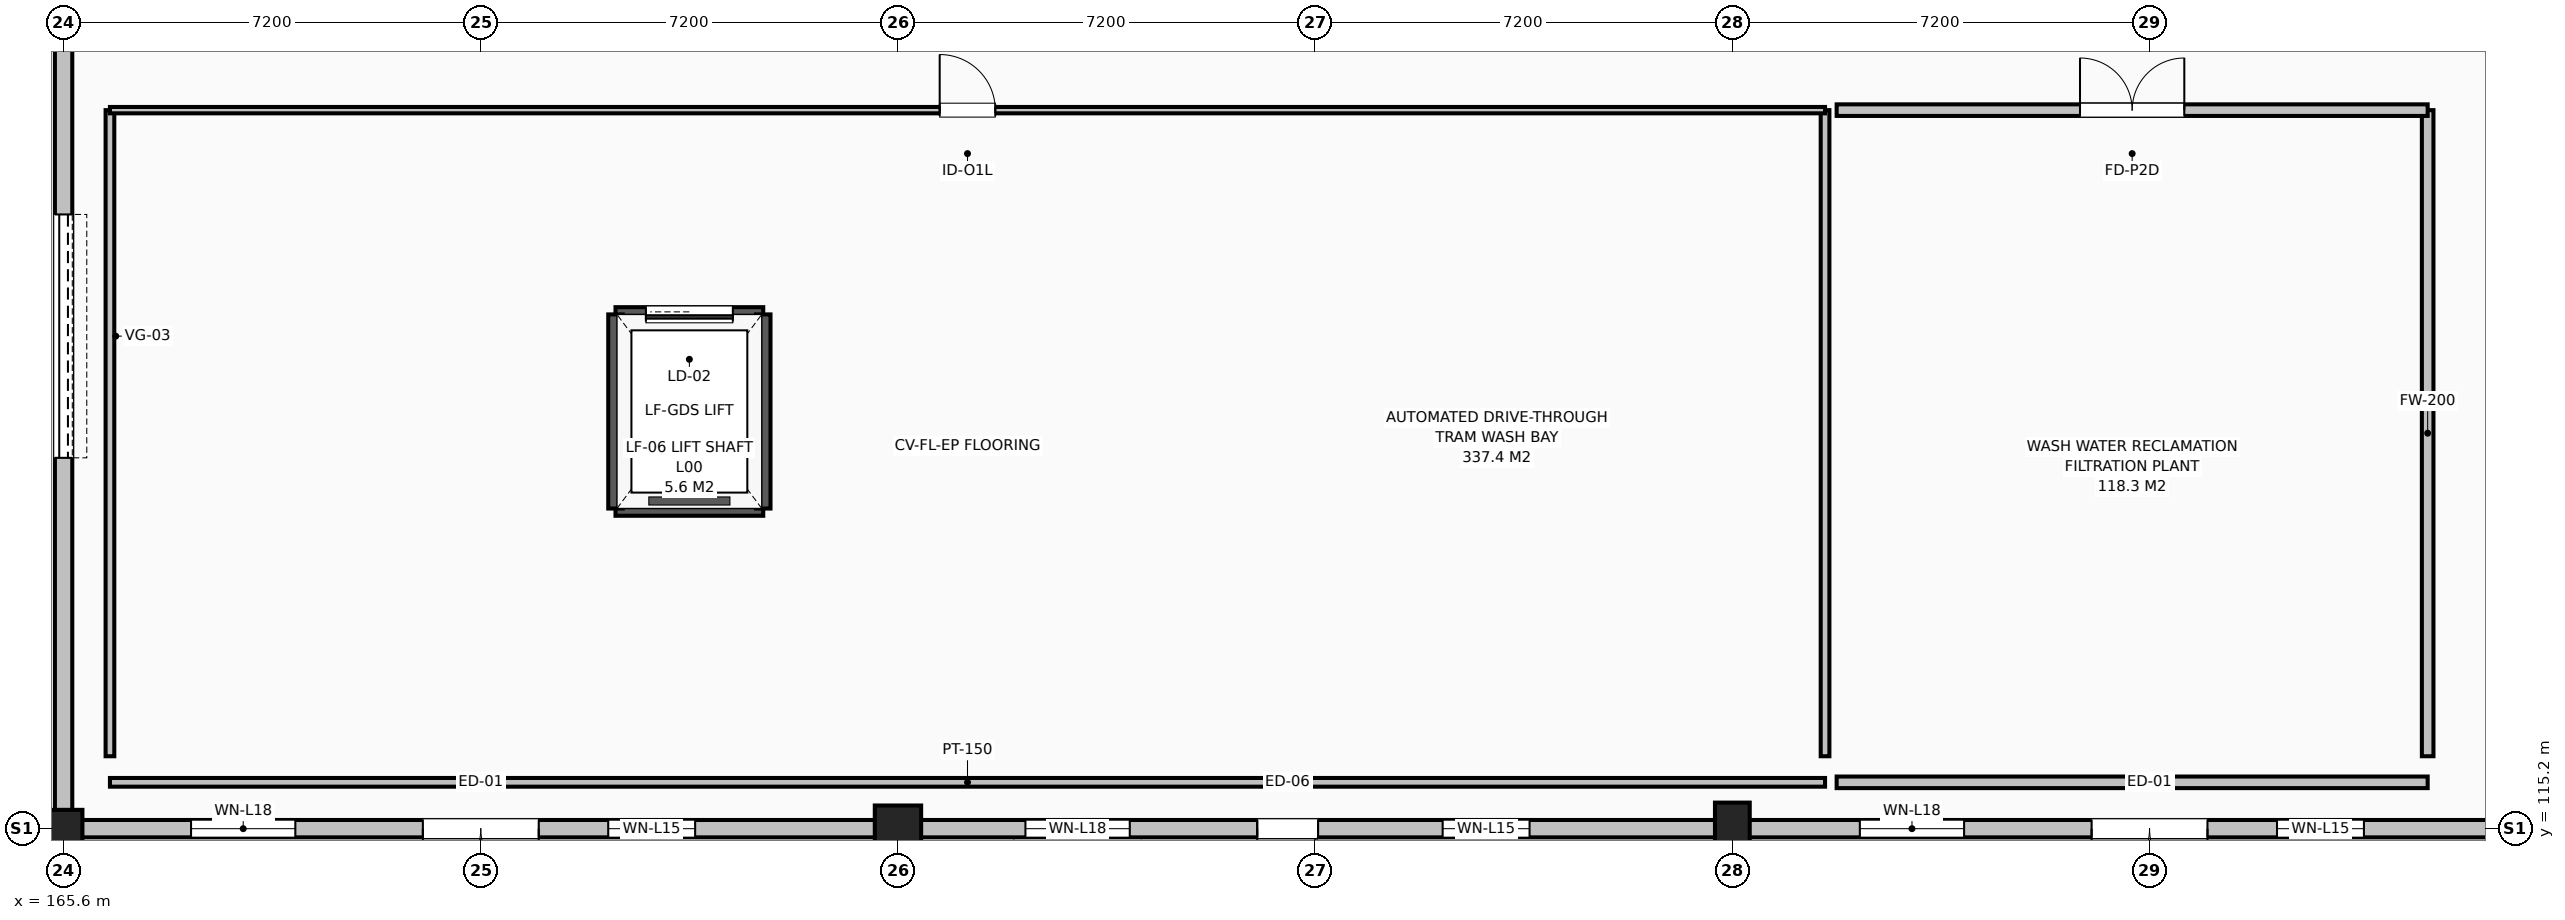
"""IFC4 building model, lengths in metres.
Left out: names, types, materials, properties, quantities, classifications, styles, units other than length and angle.
Written with IfcOpenShell. Run it as: python <this file> out.ifc"""

import sys

from ifc_helpers import new_model, si_unit, direction, frame, frame_2d, origin, origin_2d, place, context, subcontext, project, spatial, rectangle, extrude, element, fill, save


model = new_model("IFC4")
c1 = context("Model", 3, precision=1e-05, world=origin(), true_north=direction((0.0, 1.0)))
c2 = subcontext(c1, "Body", "Model", "MODEL_VIEW")
j1 = project(units=[si_unit("LENGTHUNIT", "METRE"), si_unit("PLANEANGLEUNIT", "RADIAN")], contexts=[c1])
p1 = place(None, origin())
s1 = spatial("IfcSite", under=j1, at=p1, CompositionType="ELEMENT")
p2 = place(p1, origin())
s2 = spatial("IfcBuilding", under=s1, at=p2, CompositionType="ELEMENT")
p3 = place(p2, origin())
s3 = spatial("IfcBuildingStorey", under=s2, at=p3, CompositionType="ELEMENT", Elevation=0.0)
p4 = place(p3, frame((165.6, 115.2, 0.0), z_axis=(0.0, 0.0, 1.0), x_axis=(1.0, 0.0, 0.0)))
e1 = element("IfcColumn", 1, at=p4, inside=s3, PredefinedType="COLUMN", context=c2, shape_type="SweptSolid", body=[
    extrude(rectangle(XDim=0.65, YDim=0.65, at=origin_2d()), origin(), (0.0, 0.0, 1.0), 4.8),
])
p5 = place(p3, frame((180.0, 115.2, 0.0), z_axis=(0.0, 0.0, 1.0), x_axis=(1.0, 0.0, 0.0)))
e2 = element("IfcColumn", 2, at=p5, inside=s3, PredefinedType="COLUMN", context=c2, shape_type="SweptSolid", body=[
    extrude(rectangle(XDim=0.8, YDim=0.8, at=origin_2d()), origin(), (0.0, 0.0, 1.0), 4.8),
])
p6 = place(p3, frame((194.4, 115.2, 0.0), z_axis=(0.0, 0.0, 1.0), x_axis=(1.0, 0.0, 0.0)))
e3 = element("IfcColumn", 3, at=p6, inside=s3, PredefinedType="COLUMN", context=c2, shape_type="SweptSolid", body=[
    extrude(rectangle(XDim=0.6, YDim=0.9, at=origin_2d()), origin(), (0.0, 0.0, 1.0), 4.8),
])
p7 = place(p3, frame((165.6, 115.2, 0.0), z_axis=(0.0, 0.0, 1.0), x_axis=(1.0, 0.0, 0.0)))
e4 = element("IfcWall", 4, at=p7, inside=s3, PredefinedType="SOLIDWALL", context=c2, shape_type="SweptSolid", body=[
    extrude(rectangle(XDim=50.4, YDim=0.3, at=frame_2d((25.2, 0.0))), origin(), (0.0, 0.0, 1.0), 4.25),
])
p8 = place(p7, frame((2.2, 0.0, 1.4)))
e5 = element("IfcOpeningElement", 5, at=p8, cuts=e4, PredefinedType="OPENING", context=c2, shape_type="SweptSolid", body=[
    extrude(rectangle(XDim=1.8, YDim=1.15, at=frame_2d((0.9, 0.575))), frame((0.0, 0.16, 0.0), z_axis=(0.0, -1.0, 0.0), x_axis=(1.0, 0.0, 0.0)), (0.0, 0.0, 1.0), 0.32),
])
p9 = place(p7, frame((9.4, 0.0, 1.4)))
e6 = element("IfcOpeningElement", 6, at=p9, cuts=e4, PredefinedType="OPENING", context=c2, shape_type="SweptSolid", body=[
    extrude(rectangle(XDim=1.5, YDim=1.15, at=frame_2d((0.75, 0.575))), frame((0.0, 0.16, 0.0), z_axis=(0.0, -1.0, 0.0), x_axis=(1.0, 0.0, 0.0)), (0.0, 0.0, 1.0), 0.32),
])
p10 = place(p7, frame((16.6, 0.0, 1.4)))
e7 = element("IfcOpeningElement", 7, at=p10, cuts=e4, PredefinedType="OPENING", context=c2, shape_type="SweptSolid", body=[
    extrude(rectangle(XDim=1.8, YDim=1.15, at=frame_2d((0.9, 0.575))), frame((0.0, 0.16, 0.0), z_axis=(0.0, -1.0, 0.0), x_axis=(1.0, 0.0, 0.0)), (0.0, 0.0, 1.0), 0.32),
])
p11 = place(p7, frame((23.8, 0.0, 1.4)))
e8 = element("IfcOpeningElement", 8, at=p11, cuts=e4, PredefinedType="OPENING", context=c2, shape_type="SweptSolid", body=[
    extrude(rectangle(XDim=1.5, YDim=1.15, at=frame_2d((0.75, 0.575))), frame((0.0, 0.16, 0.0), z_axis=(0.0, -1.0, 0.0), x_axis=(1.0, 0.0, 0.0)), (0.0, 0.0, 1.0), 0.32),
])
p12 = place(p7, frame((31.0, 0.0, 1.4)))
e9 = element("IfcOpeningElement", 9, at=p12, cuts=e4, PredefinedType="OPENING", context=c2, shape_type="SweptSolid", body=[
    extrude(rectangle(XDim=1.8, YDim=1.15, at=frame_2d((0.9, 0.575))), frame((0.0, 0.16, 0.0), z_axis=(0.0, -1.0, 0.0), x_axis=(1.0, 0.0, 0.0)), (0.0, 0.0, 1.0), 0.32),
])
p13 = place(p7, frame((38.2, 0.0, 1.4)))
e10 = element("IfcOpeningElement", 10, at=p13, cuts=e4, PredefinedType="OPENING", context=c2, shape_type="SweptSolid", body=[
    extrude(rectangle(XDim=1.5, YDim=1.15, at=frame_2d((0.75, 0.575))), frame((0.0, 0.16, 0.0), z_axis=(0.0, -1.0, 0.0), x_axis=(1.0, 0.0, 0.0)), (0.0, 0.0, 1.0), 0.32),
])
p14 = place(p7, frame((6.2, 0.0, 0.0)))
e11 = element("IfcOpeningElement", 11, at=p14, cuts=e4, PredefinedType="OPENING", context=c2, shape_type="SweptSolid", body=[
    extrude(rectangle(XDim=2.0, YDim=2.35, at=frame_2d((1.0, 1.175))), frame((0.0, 0.16, 0.0), z_axis=(0.0, -1.0, 0.0), x_axis=(1.0, 0.0, 0.0)), (0.0, 0.0, 1.0), 0.32),
])
p15 = place(p7, frame((20.6, 0.0, 0.0)))
e12 = element("IfcOpeningElement", 12, at=p15, cuts=e4, PredefinedType="OPENING", context=c2, shape_type="SweptSolid", body=[
    extrude(rectangle(XDim=1.05, YDim=2.1, at=frame_2d((0.525, 1.05))), frame((0.0, 0.16, 0.0), z_axis=(0.0, -1.0, 0.0), x_axis=(1.0, 0.0, 0.0)), (0.0, 0.0, 1.0), 0.32),
])
p16 = place(p7, frame((35.0, 0.0, 0.0)))
e13 = element("IfcOpeningElement", 13, at=p16, cuts=e4, PredefinedType="OPENING", context=c2, shape_type="SweptSolid", body=[
    extrude(rectangle(XDim=2.0, YDim=2.35, at=frame_2d((1.0, 1.175))), frame((0.0, 0.16, 0.0), z_axis=(0.0, -1.0, 0.0), x_axis=(1.0, 0.0, 0.0)), (0.0, 0.0, 1.0), 0.32),
])
p17 = place(p3, frame((165.6, 144.0, 0.0), z_axis=(0.0, 0.0, 1.0), x_axis=(0.0, -1.0, 0.0)))
e14 = element("IfcWall", 14, at=p17, inside=s3, PredefinedType="SOLIDWALL", context=c2, shape_type="SweptSolid", body=[
    extrude(rectangle(XDim=28.8, YDim=0.3, at=frame_2d((14.4, 0.0))), origin(), (0.0, 0.0, 1.0), 4.25),
])
p18 = place(p17, frame((4.2, 0.0, 0.0)))
e15 = element("IfcOpeningElement", 15, at=p18, cuts=e14, PredefinedType="OPENING", context=c2, shape_type="SweptSolid", body=[
    extrude(rectangle(XDim=4.2, YDim=3.5, at=frame_2d((2.1, 1.75))), frame((0.0, 0.16, 0.0), z_axis=(0.0, -1.0, 0.0), x_axis=(1.0, 0.0, 0.0)), (0.0, 0.0, 1.0), 0.32),
])
p19 = place(p17, frame((18.2, 0.0, 0.0)))
e16 = element("IfcOpeningElement", 16, at=p19, cuts=e14, PredefinedType="OPENING", context=c2, shape_type="SweptSolid", body=[
    extrude(rectangle(XDim=4.2, YDim=3.5, at=frame_2d((2.1, 1.75))), frame((0.0, 0.16, 0.0), z_axis=(0.0, -1.0, 0.0), x_axis=(1.0, 0.0, 0.0)), (0.0, 0.0, 1.0), 0.32),
])
p20 = place(p3, frame((175.125, 120.725, 0.0), z_axis=(0.0, 0.0, 1.0), x_axis=(1.0, 0.0, 0.0)))
e17 = element("IfcWall", 17, at=p20, inside=s3, PredefinedType="SHEAR", context=c2, shape_type="SweptSolid", body=[
    extrude(rectangle(XDim=2.55, YDim=0.25, at=frame_2d((1.275, 0.0))), origin(), (0.0, 0.0, 1.0), 4.5),
])
p21 = place(p3, frame((177.675, 124.075, 0.0), z_axis=(0.0, 0.0, 1.0), x_axis=(-1.0, 0.0, 0.0)))
e18 = element("IfcWall", 18, at=p21, inside=s3, PredefinedType="SHEAR", context=c2, shape_type="SweptSolid", body=[
    extrude(rectangle(XDim=2.55, YDim=0.25, at=frame_2d((1.275, 0.0))), origin(), (0.0, 0.0, 1.0), 4.5),
])
p22 = place(p21, frame((0.525, 0.0, 0.0)))
e19 = element("IfcOpeningElement", 19, at=p22, cuts=e18, PredefinedType="OPENING", context=c2, shape_type="SweptSolid", body=[
    extrude(rectangle(XDim=1.5, YDim=2.2, at=frame_2d((0.75, 1.1))), frame((0.0, 0.135, 0.0), z_axis=(0.0, -1.0, 0.0), x_axis=(1.0, 0.0, 0.0)), (0.0, 0.0, 1.0), 0.27),
])
for number, where, z_axis, x_axis in (
    (20, (175.125, 124.075, 0.0), (0.0, 0.0, 1.0), (0.0, -1.0, 0.0)),
    (21, (177.675, 120.725, 0.0), (0.0, 0.0, 1.0), (0.0, 1.0, 0.0)),
):
    element("IfcWall", number, at=place(p3, frame(where, z_axis=z_axis, x_axis=x_axis)), inside=s3, PredefinedType="SHEAR", context=c2, shape_type="SweptSolid", body=[
        extrude(rectangle(XDim=3.35, YDim=0.25, at=frame_2d((1.675, 0.0))), origin(), (0.0, 0.0, 1.0), 4.5),
    ])
p23 = place(p3, frame((196.0, 116.0, 0.0), z_axis=(0.0, 0.0, 1.0), x_axis=(-1.0, 0.0, 0.0)))
e22 = element("IfcWall", 22, at=p23, inside=s3, PredefinedType="PARTITIONING", context=c2, shape_type="SweptSolid", body=[
    extrude(rectangle(XDim=29.6, YDim=0.15, at=frame_2d((14.8, 0.0))), origin(), (0.0, 0.0, 1.0), 3.974),
])
for number, where, z_axis, x_axis in (
    (23, (196.0, 116.45, 0.0), (0.0, 0.0, 1.0), (0.0, 1.0, 0.0)),
    (24, (166.4, 127.6, 0.0), (0.0, 0.0, 1.0), (0.0, -1.0, 0.0)),
):
    element("IfcWall", number, at=place(p3, frame(where, z_axis=z_axis, x_axis=x_axis)), inside=s3, PredefinedType="PARTITIONING", context=c2, shape_type="SweptSolid", body=[
        extrude(rectangle(XDim=11.15, YDim=0.15, at=frame_2d((5.575, 0.0))), origin(), (0.0, 0.0, 1.0), 4.1),
    ])
p24 = place(p3, frame((166.4, 127.6, 0.0), z_axis=(0.0, 0.0, 1.0), x_axis=(1.0, 0.0, 0.0)))
e25 = element("IfcWall", 25, at=p24, inside=s3, PredefinedType="PARTITIONING", context=c2, shape_type="SweptSolid", body=[
    extrude(rectangle(XDim=29.6, YDim=0.11, at=frame_2d((14.8, 0.0))), origin(), (0.0, 0.0, 1.0), 3.974),
])
p25 = place(p24, frame((14.32, 0.0, 0.0)))
e26 = element("IfcOpeningElement", 26, at=p25, cuts=e25, PredefinedType="OPENING", context=c2, shape_type="SweptSolid", body=[
    extrude(rectangle(XDim=0.96, YDim=2.15, at=frame_2d((0.48, 1.075))), frame((0.0, 0.065, 0.0), z_axis=(0.0, -1.0, 0.0), x_axis=(1.0, 0.0, 0.0)), (0.0, 0.0, 1.0), 0.13),
])
p26 = place(p3, frame((206.4, 116.0, 0.0), z_axis=(0.0, 0.0, 1.0), x_axis=(-1.0, 0.0, 0.0)))
e27 = element("IfcWall", 27, at=p26, inside=s3, PredefinedType="SOLIDWALL", context=c2, shape_type="SweptSolid", body=[
    extrude(rectangle(XDim=10.2, YDim=0.2, at=frame_2d((5.1, 0.0))), origin(), (0.0, 0.0, 1.0), 4.1),
])
p27 = place(p3, frame((206.4, 116.45, 0.0), z_axis=(0.0, 0.0, 1.0), x_axis=(0.0, 1.0, 0.0)))
e28 = element("IfcWall", 28, at=p27, inside=s3, PredefinedType="SOLIDWALL", context=c2, shape_type="SweptSolid", body=[
    extrude(rectangle(XDim=11.15, YDim=0.2, at=frame_2d((5.575, 0.0))), origin(), (0.0, 0.0, 1.0), 4.1),
])
p28 = place(p3, frame((196.2, 127.6, 0.0), z_axis=(0.0, 0.0, 1.0), x_axis=(1.0, 0.0, 0.0)))
e29 = element("IfcWall", 29, at=p28, inside=s3, PredefinedType="SOLIDWALL", context=c2, shape_type="SweptSolid", body=[
    extrude(rectangle(XDim=10.2, YDim=0.2, at=frame_2d((5.1, 0.0))), origin(), (0.0, 0.0, 1.0), 4.1),
])
p29 = place(p28, frame((4.2, 0.0, 0.0)))
e30 = element("IfcOpeningElement", 30, at=p29, cuts=e29, PredefinedType="OPENING", context=c2, shape_type="SweptSolid", body=[
    extrude(rectangle(XDim=1.8, YDim=2.2, at=frame_2d((0.9, 1.1))), frame((0.0, 0.11, 0.0), z_axis=(0.0, -1.0, 0.0), x_axis=(1.0, 0.0, 0.0)), (0.0, 0.0, 1.0), 0.22),
])
p30 = place(p8, origin())
e31 = element("IfcWindow", 31, at=p30, inside=s3, PartitioningType="SINGLE_PANEL", PredefinedType="WINDOW", context=c2, shape_type="SweptSolid", body=[
    extrude(rectangle(XDim=1.8, YDim=1.15, at=frame_2d((0.9, 0.575))), frame((0.0, 0.03, 0.0), z_axis=(0.0, -1.0, 0.0), x_axis=(1.0, 0.0, 0.0)), (0.0, 0.0, 1.0), 0.06),
])
fill(e5, e31)
p31 = place(p9, origin())
e32 = element("IfcWindow", 32, at=p31, inside=s3, PartitioningType="SINGLE_PANEL", PredefinedType="WINDOW", context=c2, shape_type="SweptSolid", body=[
    extrude(rectangle(XDim=1.5, YDim=1.15, at=frame_2d((0.75, 0.575))), frame((0.0, 0.03, 0.0), z_axis=(0.0, -1.0, 0.0), x_axis=(1.0, 0.0, 0.0)), (0.0, 0.0, 1.0), 0.06),
])
fill(e6, e32)
p32 = place(p10, origin())
e33 = element("IfcWindow", 33, at=p32, inside=s3, PartitioningType="SINGLE_PANEL", PredefinedType="WINDOW", context=c2, shape_type="SweptSolid", body=[
    extrude(rectangle(XDim=1.8, YDim=1.15, at=frame_2d((0.9, 0.575))), frame((0.0, 0.03, 0.0), z_axis=(0.0, -1.0, 0.0), x_axis=(1.0, 0.0, 0.0)), (0.0, 0.0, 1.0), 0.06),
])
fill(e7, e33)
p33 = place(p11, origin())
e34 = element("IfcWindow", 34, at=p33, inside=s3, PartitioningType="SINGLE_PANEL", PredefinedType="WINDOW", context=c2, shape_type="SweptSolid", body=[
    extrude(rectangle(XDim=1.5, YDim=1.15, at=frame_2d((0.75, 0.575))), frame((0.0, 0.03, 0.0), z_axis=(0.0, -1.0, 0.0), x_axis=(1.0, 0.0, 0.0)), (0.0, 0.0, 1.0), 0.06),
])
fill(e8, e34)
p34 = place(p12, origin())
e35 = element("IfcWindow", 35, at=p34, inside=s3, PartitioningType="SINGLE_PANEL", PredefinedType="WINDOW", context=c2, shape_type="SweptSolid", body=[
    extrude(rectangle(XDim=1.8, YDim=1.15, at=frame_2d((0.9, 0.575))), frame((0.0, 0.03, 0.0), z_axis=(0.0, -1.0, 0.0), x_axis=(1.0, 0.0, 0.0)), (0.0, 0.0, 1.0), 0.06),
])
fill(e9, e35)
p35 = place(p13, origin())
e36 = element("IfcWindow", 36, at=p35, inside=s3, PartitioningType="SINGLE_PANEL", PredefinedType="WINDOW", context=c2, shape_type="SweptSolid", body=[
    extrude(rectangle(XDim=1.5, YDim=1.15, at=frame_2d((0.75, 0.575))), frame((0.0, 0.03, 0.0), z_axis=(0.0, -1.0, 0.0), x_axis=(1.0, 0.0, 0.0)), (0.0, 0.0, 1.0), 0.06),
])
fill(e10, e36)
p36 = place(p14, frame((2.0, 0.0, 0.0), z_axis=(0.0, 0.0, 1.0), x_axis=(-1.0, 0.0, 0.0)))
e37 = element("IfcDoor", 37, at=p36, inside=s3, OperationType="DOUBLE_SWING_LEFT", PredefinedType="DOOR", context=c2, shape_type="SweptSolid", body=[
    extrude(rectangle(XDim=2.0, YDim=2.35, at=frame_2d((1.0, 1.175))), frame((0.0, 0.025, 0.0), z_axis=(0.0, -1.0, 0.0), x_axis=(1.0, 0.0, 0.0)), (0.0, 0.0, 1.0), 0.05),
])
fill(e11, e37)
p37 = place(p15, frame((1.05, 0.0, 0.0), z_axis=(0.0, 0.0, 1.0), x_axis=(-1.0, 0.0, 0.0)))
e38 = element("IfcDoor", 38, at=p37, inside=s3, OperationType="SINGLE_SWING_RIGHT", PredefinedType="DOOR", context=c2, shape_type="SweptSolid", body=[
    extrude(rectangle(XDim=1.05, YDim=2.1, at=frame_2d((0.525, 1.05))), frame((0.0, 0.025, 0.0), z_axis=(0.0, -1.0, 0.0), x_axis=(1.0, 0.0, 0.0)), (0.0, 0.0, 1.0), 0.05),
])
fill(e12, e38)
p38 = place(p16, frame((2.0, 0.0, 0.0), z_axis=(0.0, 0.0, 1.0), x_axis=(-1.0, 0.0, 0.0)))
e39 = element("IfcDoor", 39, at=p38, inside=s3, OperationType="DOUBLE_SWING_LEFT", PredefinedType="DOOR", context=c2, shape_type="SweptSolid", body=[
    extrude(rectangle(XDim=2.0, YDim=2.35, at=frame_2d((1.0, 1.175))), frame((0.0, 0.025, 0.0), z_axis=(0.0, -1.0, 0.0), x_axis=(1.0, 0.0, 0.0)), (0.0, 0.0, 1.0), 0.05),
])
fill(e13, e39)
p39 = place(p19, origin())
e40 = element("IfcDoor", 40, at=p39, inside=s3, OperationType="ROLLINGUP", PredefinedType="GATE", context=c2, shape_type="SweptSolid", body=[
    extrude(rectangle(XDim=4.2, YDim=3.5, at=frame_2d((2.1, 1.75))), frame((0.0, 0.025, 0.0), z_axis=(0.0, -1.0, 0.0), x_axis=(1.0, 0.0, 0.0)), (0.0, 0.0, 1.0), 0.05),
])
fill(e16, e40)
p40 = place(p22, origin())
e41 = element("IfcDoor", 41, at=p40, inside=s3, OperationType="SLIDING_TO_RIGHT", PredefinedType="DOOR", context=c2, shape_type="SweptSolid", body=[
    extrude(rectangle(XDim=1.5, YDim=2.2, at=frame_2d((0.75, 1.1))), frame((0.0, 0.025, 0.0), z_axis=(0.0, -1.0, 0.0), x_axis=(1.0, 0.0, 0.0)), (0.0, 0.0, 1.0), 0.05),
])
fill(e19, e41)
p41 = place(p25, origin())
e42 = element("IfcDoor", 42, at=p41, inside=s3, OperationType="SINGLE_SWING_LEFT", PredefinedType="DOOR", context=c2, shape_type="SweptSolid", body=[
    extrude(rectangle(XDim=0.96, YDim=2.15, at=frame_2d((0.48, 1.075))), frame((0.0, 0.025, 0.0), z_axis=(0.0, -1.0, 0.0), x_axis=(1.0, 0.0, 0.0)), (0.0, 0.0, 1.0), 0.05),
])
fill(e26, e42)
p42 = place(p29, origin())
e43 = element("IfcDoor", 43, at=p42, inside=s3, OperationType="DOUBLE_SWING_LEFT", PredefinedType="DOOR", context=c2, shape_type="SweptSolid", body=[
    extrude(rectangle(XDim=1.8, YDim=2.2, at=frame_2d((0.9, 1.1))), frame((0.0, 0.025, 0.0), z_axis=(0.0, -1.0, 0.0), x_axis=(1.0, 0.0, 0.0)), (0.0, 0.0, 1.0), 0.05),
])
fill(e30, e43)
save(model, sys.argv[1])
